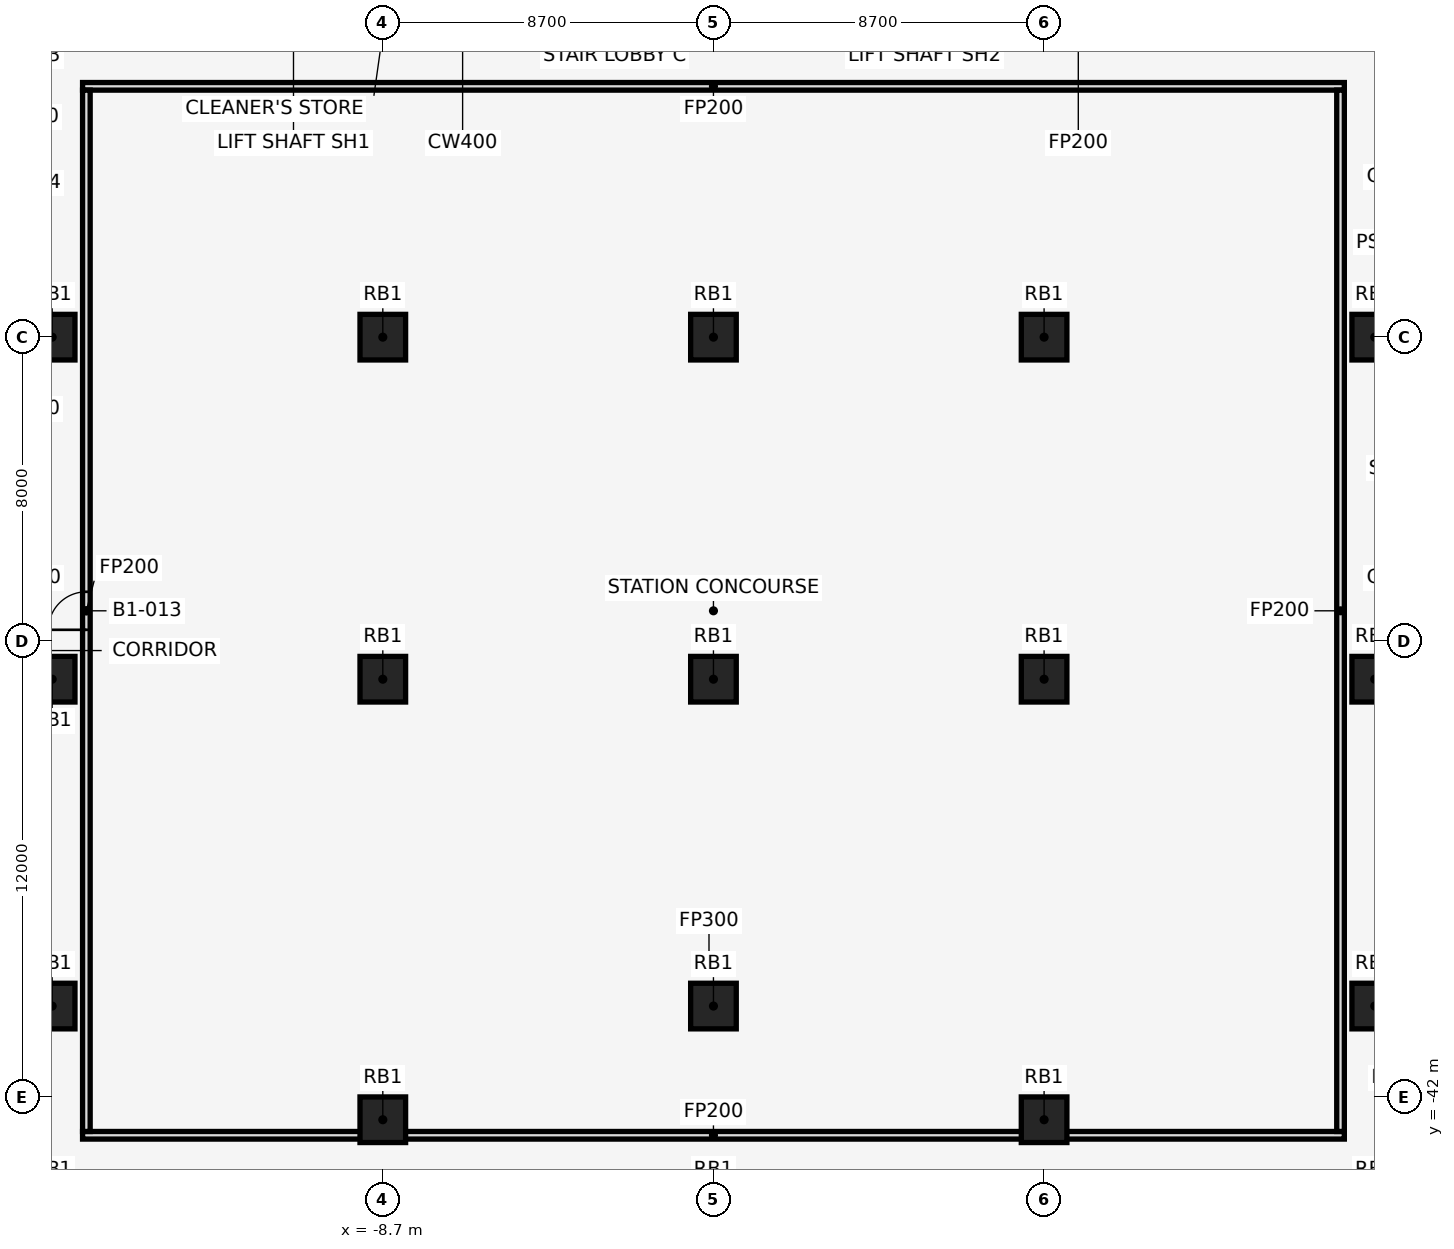
"""IFC4 building model, lengths in metres.
Left out: names, types, materials, properties, quantities, classifications, styles, units other than length and angle.
Written with IfcOpenShell. Run it as: python <this file> out.ifc"""

import sys

from ifc_helpers import new_model, si_unit, direction, frame, frame_2d, origin, origin_2d, place, context, subcontext, project, spatial, rectangle, extrude, element, fill, save


model = new_model("IFC4")
c1 = context("Model", 3, precision=1e-05, world=origin(), true_north=direction((0.0, 1.0)))
c2 = subcontext(c1, "Body", "Model", "MODEL_VIEW")
j1 = project(units=[si_unit("LENGTHUNIT", "METRE"), si_unit("PLANEANGLEUNIT", "RADIAN")], contexts=[c1])
p1 = place(None, origin())
s1 = spatial("IfcSite", under=j1, at=p1, CompositionType="ELEMENT")
p2 = place(p1, origin())
s2 = spatial("IfcBuilding", under=s1, at=p2, CompositionType="ELEMENT")
p3 = place(p2, frame((0.0, 0.0, -5.0)))
s3 = spatial("IfcBuildingStorey", under=s2, at=p3, CompositionType="ELEMENT", Elevation=-5.0)
for number, where, z_axis, x_axis in (
    (1, (-17.4, -39.6, 0.0), (0.0, 0.0, 1.0), (1.0, 0.0, 0.0)),
    (2, (-8.7, -42.591, 0.0), (0.0, 0.0, 1.0), (1.0, 0.0, 0.0)),
    (3, (0.0, -39.6, 0.0), (0.0, 0.0, 1.0), (1.0, 0.0, 0.0)),
    (4, (8.7, -42.591, 0.0), (0.0, 0.0, 1.0), (1.0, 0.0, 0.0)),
    (5, (17.4, -39.6, 0.0), (0.0, 0.0, 1.0), (1.0, 0.0, 0.0)),
    (6, (-17.4, -22.0, 0.0), (0.0, 0.0, 1.0), (1.0, 0.0, 0.0)),
    (7, (-8.7, -22.0, 0.0), (0.0, 0.0, 1.0), (1.0, 0.0, 0.0)),
    (8, (0.0, -22.0, 0.0), (0.0, 0.0, 1.0), (1.0, 0.0, 0.0)),
    (9, (8.7, -22.0, 0.0), (0.0, 0.0, 1.0), (1.0, 0.0, 0.0)),
    (10, (17.4, -22.0, 0.0), (0.0, 0.0, 1.0), (1.0, 0.0, 0.0)),
    (11, (-17.4, -31.0, 0.0), (0.0, 0.0, 1.0), (1.0, 0.0, 0.0)),
    (12, (-8.7, -31.0, 0.0), (0.0, 0.0, 1.0), (1.0, 0.0, 0.0)),
    (13, (0.0, -31.0, 0.0), (0.0, 0.0, 1.0), (1.0, 0.0, 0.0)),
    (14, (8.7, -31.0, 0.0), (0.0, 0.0, 1.0), (1.0, 0.0, 0.0)),
    (15, (17.4, -31.0, 0.0), (0.0, 0.0, 1.0), (1.0, 0.0, 0.0)),
):
    element("IfcColumn", number, at=place(p3, frame(where, z_axis=z_axis, x_axis=x_axis)), inside=s3, PredefinedType="COLUMN", context=c2, shape_type="SweptSolid", body=[
        extrude(rectangle(XDim=1.2, YDim=1.2, at=origin_2d()), origin(), (0.0, 0.0, 1.0), 5.0),
    ])
for number, where, z_axis, x_axis in (
    (16, (-16.6, -43.0, 0.0), (0.0, 0.0, 1.0), (1.0, 0.0, 0.0)),
    (17, (-16.6, -15.4, 0.0), (0.0, 0.0, 1.0), (1.0, 0.0, 0.0)),
):
    element("IfcWall", number, at=place(p3, frame(where, z_axis=z_axis, x_axis=x_axis)), inside=s3, PredefinedType="PARTITIONING", context=c2, shape_type="SweptSolid", body=[
        extrude(rectangle(XDim=33.2, YDim=0.2, at=frame_2d((16.6, 0.0))), origin(), (0.0, 0.0, 1.0), 4.7),
    ])
p4 = place(p3, frame((-16.5, -42.9, 0.0), z_axis=(0.0, 0.0, 1.0), x_axis=(0.0, 1.0, 0.0)))
e18 = element("IfcWall", 18, at=p4, inside=s3, PredefinedType="PARTITIONING", context=c2, shape_type="SweptSolid", body=[
    extrude(rectangle(XDim=27.4, YDim=0.2, at=frame_2d((13.7, 0.0))), origin(), (0.0, 0.0, 1.0), 4.7),
])
p5 = place(p4, frame((13.2, 0.0, 0.0)))
e19 = element("IfcOpeningElement", 19, at=p5, cuts=e18, PredefinedType="OPENING", context=c2, shape_type="SweptSolid", body=[
    extrude(rectangle(XDim=1.0, YDim=2.1, at=frame_2d((0.5, 1.05))), frame((0.0, 0.112, 0.0), z_axis=(0.0, -1.0, 0.0), x_axis=(1.0, 0.0, 0.0)), (0.0, 0.0, 1.0), 0.224),
])
p6 = place(p3, frame((16.5, -42.9, 0.0), z_axis=(0.0, 0.0, 1.0), x_axis=(0.0, 1.0, 0.0)))
e20 = element("IfcWall", 20, at=p6, inside=s3, PredefinedType="PARTITIONING", context=c2, shape_type="SweptSolid", body=[
    extrude(rectangle(XDim=27.4, YDim=0.2, at=frame_2d((13.7, 0.0))), origin(), (0.0, 0.0, 1.0), 4.7),
])
p7 = place(p5, frame((1.0, 0.0, 0.0), z_axis=(0.0, 0.0, 1.0), x_axis=(-1.0, 0.0, 0.0)))
e21 = element("IfcDoor", 21, at=p7, inside=s3, OperationType="SINGLE_SWING_LEFT", PredefinedType="DOOR", context=c2, shape_type="SweptSolid", body=[
    extrude(rectangle(XDim=1.0, YDim=2.1, at=frame_2d((0.5, 1.05))), frame((0.0, 0.025, 0.0), z_axis=(0.0, -1.0, 0.0), x_axis=(1.0, 0.0, 0.0)), (0.0, 0.0, 1.0), 0.05),
])
fill(e19, e21)
save(model, sys.argv[1])
